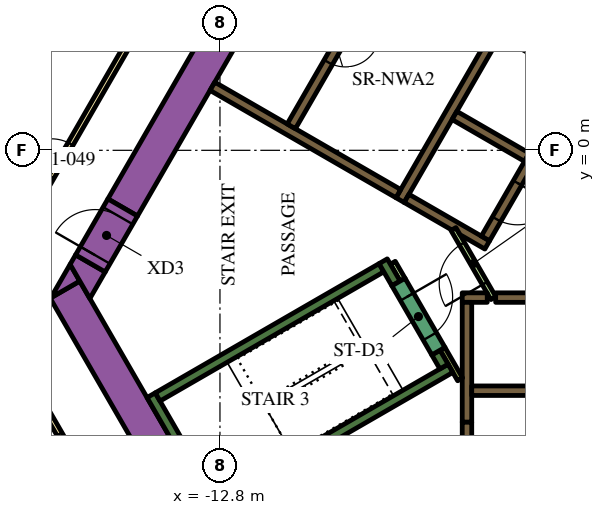
"""IFC4 building model, lengths in metres.
Left out: names, types, materials, properties, quantities, classifications, styles, units other than length and angle.
Written with IfcOpenShell. Run it as: python <this file> out.ifc"""

import sys

from ifc_helpers import new_model, si_unit, direction, frame, frame_2d, origin, place, context, subcontext, project, spatial, polyline, rectangle, outline, extrude, element, fill, save


model = new_model("IFC4")
c1 = context("Model", 3, precision=1e-05, world=origin(), true_north=direction((0.0, 1.0)))
c2 = subcontext(c1, "Body", "Model", "MODEL_VIEW")
j1 = project(units=[si_unit("LENGTHUNIT", "METRE"), si_unit("PLANEANGLEUNIT", "RADIAN")], contexts=[c1])
p1 = place(None, origin())
s1 = spatial("IfcSite", under=j1, at=p1, CompositionType="ELEMENT")
p2 = place(p1, origin())
s2 = spatial("IfcBuilding", under=s1, at=p2, CompositionType="ELEMENT")
p3 = place(p2, frame((0.0, 0.0, 31.5)))
s3 = spatial("IfcBuildingStorey", under=s2, at=p3, CompositionType="ELEMENT", Elevation=31.5)
p4 = place(p3, frame((-15.36, -1.503, 0.0), z_axis=(0.0, 0.0, 1.0), x_axis=(0.50000389221, 0.866023156604, 0.0)))
e1 = element("IfcWall", 1, at=p4, inside=s3, PredefinedType="SOLIDWALL", context=c2, shape_type="SweptSolid", body=[
    extrude(rectangle(XDim=21.0, YDim=0.9, at=frame_2d((10.5, 0.0))), origin(), (0.0, 0.0, 1.0), 3.9),
])
p5 = place(p3, frame((-12.134, -11.883, 0.0), z_axis=(0.0, 0.0, 1.0), x_axis=(-0.500005339912, 0.866022320763, 0.0)))
e2 = element("IfcWall", 2, at=p5, inside=s3, PredefinedType="SOLIDWALL", context=c2, shape_type="SweptSolid", body=[
    extrude(rectangle(XDim=9.488, YDim=0.9, at=frame_2d((4.744, 0.0))), origin(), (0.0, 0.0, 1.0), 3.9),
])
p6 = place(p3, origin())
e3 = element("IfcWall", 3, at=p6, inside=s3, PredefinedType="SOLIDWALL", context=c2, shape_type="SweptSolid", body=[
    extrude(outline(polyline([(-16.489, -3.44), (-17.251, -3.88), (-16.743, -3.0), (-16.489, -3.44)])), origin(), (0.0, 0.0, 1.0), 3.9),
])
e4 = element("IfcWall", 4, at=p6, inside=s3, PredefinedType="SOLIDWALL", context=c2, shape_type="SweptSolid", body=[
    extrude(outline(polyline([(-15.82, -3.201), (-16.223, -3.9), (-16.743, -3.0), (-16.599, -2.751), (-15.82, -3.201)])), origin(), (0.0, 0.0, 1.0), 3.9),
])
p7 = place(p3, frame((-12.885, -9.431, 0.0), z_axis=(0.0, 0.0, 1.0), x_axis=(-0.500020560727, 0.866013532718, 0.0)))
e5 = element("IfcWall", 5, at=p7, inside=s3, PredefinedType="SOLIDWALL", context=c2, shape_type="SweptSolid", body=[
    extrude(rectangle(XDim=3.45, YDim=0.25, at=frame_2d((1.725, 0.0))), origin(), (0.0, 0.0, 1.0), 3.9),
])
p8 = place(p3, frame((-14.44, -6.49, 0.0), z_axis=(0.0, 0.0, 1.0), x_axis=(0.866022966069, 0.500004222222, 0.0)))
e6 = element("IfcWall", 6, at=p8, inside=s3, PredefinedType="SOLIDWALL", context=c2, shape_type="SweptSolid", body=[
    extrude(rectangle(XDim=6.8, YDim=0.25, at=frame_2d((3.4, 0.0))), origin(), (0.0, 0.0, 1.0), 3.9),
])
p9 = place(p3, frame((-8.168, -3.503, 0.0), z_axis=(0.0, 0.0, 1.0), x_axis=(-0.499952099219, 0.866053057547, 0.0)))
e7 = element("IfcWall", 7, at=p9, inside=s3, PredefinedType="SOLIDWALL", context=c2, shape_type="SweptSolid", body=[
    extrude(rectangle(XDim=0.675, YDim=0.25, at=frame_2d((0.337, 0.0))), origin(), (0.0, 0.0, 1.0), 3.9),
])
p10 = place(p3, frame((-12.84, -9.261, 0.0), z_axis=(0.0, 0.0, 1.0), x_axis=(0.866016039709, 0.500016218704, 0.0)))
e8 = element("IfcWall", 8, at=p10, inside=s3, PredefinedType="SOLIDWALL", context=c2, shape_type="SweptSolid", body=[
    extrude(rectangle(XDim=7.05, YDim=0.25, at=frame_2d((3.525, 0.0))), origin(), (0.0, 0.0, 1.0), 3.9),
])
p11 = place(p3, frame((-6.905, -5.69, 0.0), z_axis=(0.0, 0.0, 1.0), x_axis=(-0.500402024738, 0.865793170242, 0.0)))
e9 = element("IfcWall", 9, at=p11, inside=s3, PredefinedType="SOLIDWALL", context=c2, shape_type="SweptSolid", body=[
    extrude(rectangle(XDim=0.425, YDim=0.25, at=frame_2d((0.212, 0.0))), origin(), (0.0, 0.0, 1.0), 3.9),
])
p12 = place(p3, frame((-5.545, -3.875, 0.0), z_axis=(0.0, 0.0, 1.0), x_axis=(1.0, 0.0, 0.0)))
e10 = element("IfcWall", 10, at=p12, inside=s3, PredefinedType="SOLIDWALL", context=c2, shape_type="SweptSolid", body=[
    extrude(rectangle(XDim=11.97, YDim=0.25, at=frame_2d((5.985, 0.0))), origin(), (0.0, 0.0, 1.0), 3.9),
])
p13 = place(p3, frame((-6.425, -3.875, 0.0), z_axis=(0.0, 0.0, 1.0), x_axis=(1.0, 0.0, 0.0)))
e11 = element("IfcWall", 11, at=p13, inside=s3, PredefinedType="SOLIDWALL", context=c2, shape_type="SweptSolid", body=[
    extrude(rectangle(XDim=0.658, YDim=0.25, at=frame_2d((0.329, 0.0))), origin(), (0.0, 0.0, 1.0), 3.9),
])
p14 = place(p3, frame((-6.3, -4.0, 0.0), z_axis=(0.0, 0.0, 1.0), x_axis=(0.0, -1.0, 0.0)))
e12 = element("IfcWall", 12, at=p14, inside=s3, PredefinedType="SOLIDWALL", context=c2, shape_type="SweptSolid", body=[
    extrude(rectangle(XDim=3.154, YDim=0.25, at=frame_2d((1.577, 0.0))), origin(), (0.0, 0.0, 1.0), 3.9),
])
p15 = place(p3, frame((-8.06, -1.311, 0.0), z_axis=(0.0, 0.0, 1.0), x_axis=(0.50000273126, 0.866023826885, 0.0)))
e13 = element("IfcWall", 13, at=p15, inside=s3, PredefinedType="SOLIDWALL", context=c2, shape_type="SweptSolid", body=[
    extrude(rectangle(XDim=10.33, YDim=0.25, at=frame_2d((5.165, 0.0))), origin(), (0.0, 0.0, 1.0), 3.9),
])
for number, where, z_axis, x_axis in (
    (14, (-5.369, 3.1, 0.0), (0.0, 0.0, 1.0), (0.866, -0.5, 0.0)),
    (15, (-4.724, -0.182, 0.0), (0.0, 0.0, 1.0), (-0.866, 0.5, 0.0)),
):
    element("IfcWall", number, at=place(p3, frame(where, z_axis=z_axis, x_axis=x_axis)), inside=s3, PredefinedType="SOLIDWALL", context=c2, shape_type="SweptSolid", body=[
        extrude(rectangle(XDim=2.2, YDim=0.25, at=frame_2d((1.1, 0.0))), origin(), (0.0, 0.0, 1.0), 3.9),
    ])
e16 = element("IfcWall", 16, at=p6, inside=s3, PredefinedType="SOLIDWALL", context=c2, shape_type="SweptSolid", body=[
    extrude(outline(polyline([(-5.922, -2.257), (-5.922, -2.257), (-5.705, -2.382), (-5.83, -2.598), (-6.483, -2.221), (-6.591, -2.033), (-6.591, -2.033), (-6.7, -2.096), (-7.952, -1.373), (-7.827, -1.156), (-5.922, -2.257)])), origin(), (0.0, 0.0, 1.0), 3.9),
])
p16 = place(p3, frame((-8.106, -1.14, 0.0), z_axis=(0.0, 0.0, 1.0), x_axis=(-0.866000643155, 0.500042884217, 0.0)))
e17 = element("IfcWall", 17, at=p16, inside=s3, PredefinedType="SOLIDWALL", context=c2, shape_type="SweptSolid", body=[
    extrude(rectangle(XDim=5.65, YDim=0.25, at=frame_2d((2.825, 0.0))), origin(), (0.0, 0.0, 1.0), 3.9),
])
p17 = place(p3, frame((-6.48, -6.027, 0.0), z_axis=(0.0, 0.0, 1.0), x_axis=(-0.499927229454, 0.866067413802, 0.0)))
e18 = element("IfcWall", 18, at=p17, inside=s3, PredefinedType="PARTITIONING", context=c2, shape_type="SweptSolid", body=[
    extrude(rectangle(XDim=0.929, YDim=0.15, at=frame_2d((0.464, 0.0))), origin(), (0.0, 0.0, 1.0), 3.9),
])
p18 = place(p3, frame((-8.252, -2.958, 0.0), z_axis=(0.0, 0.0, 1.0), x_axis=(0.500174715838, -0.865924508047, 0.0)))
e19 = element("IfcWall", 19, at=p18, inside=s3, PredefinedType="PARTITIONING", context=c2, shape_type="SweptSolid", body=[
    extrude(rectangle(XDim=0.514, YDim=0.15, at=frame_2d((0.257, 0.0))), origin(), (0.0, 0.0, 1.0), 2.75),
])
p19 = place(p3, frame((-6.175, -6.325, 0.0), z_axis=(0.0, 0.0, 1.0), x_axis=(1.0, 0.0, 0.0)))
e20 = element("IfcWall", 20, at=p19, inside=s3, PredefinedType="SOLIDWALL", context=c2, shape_type="SweptSolid", body=[
    extrude(rectangle(XDim=12.35, YDim=0.25, at=frame_2d((6.175, 0.0))), origin(), (0.0, 0.0, 1.0), 3.9),
])
p20 = place(p19, frame((3.205, 0.0, 0.0)))
e21 = element("IfcOpeningElement", 21, at=p20, cuts=e20, PredefinedType="OPENING", context=c2, shape_type="SweptSolid", body=[
    extrude(rectangle(XDim=0.9, YDim=2.1, at=frame_2d((0.45, 1.05))), frame((0.0, 0.135, 0.0), z_axis=(0.0, -1.0, 0.0), x_axis=(1.0, 0.0, 0.0)), (0.0, 0.0, 1.0), 0.27),
])
p21 = place(p19, frame((8.145, 0.0, 0.0)))
e22 = element("IfcOpeningElement", 22, at=p21, cuts=e20, PredefinedType="OPENING", context=c2, shape_type="SweptSolid", body=[
    extrude(rectangle(XDim=1.1, YDim=2.1, at=frame_2d((0.55, 1.05))), frame((0.0, 0.135, 0.0), z_axis=(0.0, -1.0, 0.0), x_axis=(1.0, 0.0, 0.0)), (0.0, 0.0, 1.0), 0.27),
])
p22 = place(p19, frame((10.665, 0.0, 0.0)))
e23 = element("IfcOpeningElement", 23, at=p22, cuts=e20, PredefinedType="OPENING", context=c2, shape_type="SweptSolid", body=[
    extrude(rectangle(XDim=1.1, YDim=2.1, at=frame_2d((0.55, 1.05))), frame((0.0, 0.135, 0.0), z_axis=(0.0, -1.0, 0.0), x_axis=(1.0, 0.0, 0.0)), (0.0, 0.0, 1.0), 0.27),
])
p23 = place(p3, frame((-6.008, 9.144, 0.0), z_axis=(0.0, 0.0, 1.0), x_axis=(-0.500006956611, -0.866021387346, 0.0)))
e24 = element("IfcWall", 24, at=p23, inside=s3, PredefinedType="SOLIDWALL", context=c2, shape_type="SweptSolid", body=[
    extrude(rectangle(XDim=9.83, YDim=0.25, at=frame_2d((4.915, 0.0))), origin(), (0.0, 0.0, 1.0), 3.9),
])
p24 = place(p23, frame((6.985, 0.0, 0.0)))
e25 = element("IfcOpeningElement", 25, at=p24, cuts=e24, PredefinedType="OPENING", context=c2, shape_type="SweptSolid", body=[
    extrude(rectangle(XDim=0.9, YDim=2.1, at=frame_2d((0.45, 1.05))), frame((0.0, 0.135, 0.0), z_axis=(0.0, -1.0, 0.0), x_axis=(1.0, 0.0, 0.0)), (0.0, 0.0, 1.0), 0.27),
])
p25 = place(p3, frame((-0.898, 6.194, 0.0), z_axis=(0.0, 0.0, 1.0), x_axis=(-0.499996202215, -0.866027596426, 0.0)))
e26 = element("IfcWall", 26, at=p25, inside=s3, PredefinedType="SOLIDWALL", context=c2, shape_type="SweptSolid", body=[
    extrude(rectangle(XDim=9.83, YDim=0.25, at=frame_2d((4.915, 0.0))), origin(), (0.0, 0.0, 1.0), 3.9),
])
p26 = place(p25, frame((0.585, 0.0, 0.0)))
e27 = element("IfcOpeningElement", 27, at=p26, cuts=e26, PredefinedType="OPENING", context=c2, shape_type="SweptSolid", body=[
    extrude(rectangle(XDim=1.1, YDim=2.1, at=frame_2d((0.55, 1.05))), frame((0.0, 0.135, 0.0), z_axis=(0.0, -1.0, 0.0), x_axis=(1.0, 0.0, 0.0)), (0.0, 0.0, 1.0), 0.27),
])
p27 = place(p25, frame((3.105, 0.0, 0.0)))
e28 = element("IfcOpeningElement", 28, at=p27, cuts=e26, PredefinedType="OPENING", context=c2, shape_type="SweptSolid", body=[
    extrude(rectangle(XDim=1.1, YDim=2.1, at=frame_2d((0.55, 1.05))), frame((0.0, 0.135, 0.0), z_axis=(0.0, -1.0, 0.0), x_axis=(1.0, 0.0, 0.0)), (0.0, 0.0, 1.0), 0.27),
])
p28 = place(p25, frame((5.625, 0.0, 0.0)))
e29 = element("IfcOpeningElement", 29, at=p28, cuts=e26, PredefinedType="OPENING", context=c2, shape_type="SweptSolid", body=[
    extrude(rectangle(XDim=1.1, YDim=2.1, at=frame_2d((0.55, 1.05))), frame((0.0, 0.135, 0.0), z_axis=(0.0, -1.0, 0.0), x_axis=(1.0, 0.0, 0.0)), (0.0, 0.0, 1.0), 0.27),
])
p29 = place(p25, frame((8.145, 0.0, 0.0)))
e30 = element("IfcOpeningElement", 30, at=p29, cuts=e26, PredefinedType="OPENING", context=c2, shape_type="SweptSolid", body=[
    extrude(rectangle(XDim=1.1, YDim=2.1, at=frame_2d((0.55, 1.05))), frame((0.0, 0.135, 0.0), z_axis=(0.0, -1.0, 0.0), x_axis=(1.0, 0.0, 0.0)), (0.0, 0.0, 1.0), 0.27),
])
p30 = place(p3, frame((-8.103, -3.466, 0.0), z_axis=(0.0, 0.0, 1.0), x_axis=(0.500078061341, -0.865980330357, 0.0)))
e31 = element("IfcWall", 31, at=p30, inside=s3, PredefinedType="SOLIDWALL", context=c2, shape_type="SweptSolid", body=[
    extrude(rectangle(XDim=2.1, YDim=0.4, at=frame_2d((1.05, 0.0))), origin(), (0.0, 0.0, 1.0), 3.9),
])
p31 = place(p30, frame((0.45, 0.0, 0.0)))
e32 = element("IfcOpeningElement", 32, at=p31, cuts=e31, PredefinedType="OPENING", context=c2, shape_type="SweptSolid", body=[
    extrude(rectangle(XDim=1.2, YDim=2.1, at=frame_2d((0.6, 1.05))), frame((0.0, 0.21, 0.0), z_axis=(0.0, -1.0, 0.0), x_axis=(1.0, 0.0, 0.0)), (0.0, 0.0, 1.0), 0.42),
])
p32 = place(p3, frame((-6.3, -7.154, 0.0), z_axis=(0.0, 0.0, 1.0), x_axis=(0.0, -1.0, 0.0)))
e33 = element("IfcWall", 33, at=p32, inside=s3, PredefinedType="SOLIDWALL", context=c2, shape_type="SweptSolid", body=[
    extrude(rectangle(XDim=1.8, YDim=0.25, at=frame_2d((0.9, 0.0))), origin(), (0.0, 0.0, 1.0), 3.9),
])
p33 = place(p32, frame((0.45, 0.0, 0.0)))
e34 = element("IfcOpeningElement", 34, at=p33, cuts=e33, PredefinedType="OPENING", context=c2, shape_type="SweptSolid", body=[
    extrude(rectangle(XDim=0.9, YDim=2.1, at=frame_2d((0.45, 1.05))), frame((0.0, 0.135, 0.0), z_axis=(0.0, -1.0, 0.0), x_axis=(1.0, 0.0, 0.0)), (0.0, 0.0, 1.0), 0.27),
])
p34 = place(p3, frame((-5.606, -3.89, 0.0), z_axis=(0.0, 0.0, 1.0), x_axis=(-0.500027713859, 0.866009402589, 0.0)))
e35 = element("IfcWall", 35, at=p34, inside=s3, PredefinedType="PARTITIONING", context=c2, shape_type="SweptSolid", body=[
    extrude(rectangle(XDim=2.1, YDim=0.15, at=frame_2d((1.05, 0.0))), origin(), (0.0, 0.0, 1.0), 2.75),
])
p35 = place(p34, frame((0.45, 0.0, 0.0)))
e36 = element("IfcOpeningElement", 36, at=p35, cuts=e35, PredefinedType="OPENING", context=c2, shape_type="SweptSolid", body=[
    extrude(rectangle(XDim=1.2, YDim=2.1, at=frame_2d((0.6, 1.05))), frame((0.0, 0.085, 0.0), z_axis=(0.0, -1.0, 0.0), x_axis=(1.0, 0.0, 0.0)), (0.0, 0.0, 1.0), 0.17),
])
p36 = place(p3, frame((-16.209, -2.976, 0.0), z_axis=(0.0, 0.0, 1.0), x_axis=(0.499954529098, 0.86605165483, 0.0)))
e37 = element("IfcWall", 37, at=p36, inside=s3, PredefinedType="SOLIDWALL", context=c2, shape_type="SweptSolid", body=[
    extrude(rectangle(XDim=1.7, YDim=0.9, at=frame_2d((0.85, 0.0))), origin(), (0.0, 0.0, 1.0), 3.9),
])
p37 = place(p36, frame((0.25, 0.0, 0.0)))
e38 = element("IfcOpeningElement", 38, at=p37, cuts=e37, PredefinedType="OPENING", context=c2, shape_type="SweptSolid", body=[
    extrude(rectangle(XDim=1.2, YDim=2.1, at=frame_2d((0.6, 1.05))), frame((0.0, 0.46, 0.0), z_axis=(0.0, -1.0, 0.0), x_axis=(1.0, 0.0, 0.0)), (0.0, 0.0, 1.0), 0.92),
])
p38 = place(p3, frame((-19.081, -3.9, 0.0), z_axis=(0.0, 0.0, 1.0), x_axis=(0.499998313975, 0.866026377209, 0.0)))
e39 = element("IfcWall", 39, at=p38, inside=s3, PredefinedType="PARTITIONING", context=c2, shape_type="SweptSolid", body=[
    extrude(rectangle(XDim=25.766, YDim=0.15, at=frame_2d((12.883, 0.0))), origin(), (0.0, 0.0, 1.0), 2.75),
])
p39 = place(p38, frame((24.586, 0.0, 0.0)))
e40 = element("IfcOpeningElement", 40, at=p39, cuts=e39, PredefinedType="OPENING", context=c2, shape_type="SweptSolid", body=[
    extrude(rectangle(XDim=1.0, YDim=2.1, at=frame_2d((0.5, 1.05))), frame((0.0, 0.085, 0.0), z_axis=(0.0, -1.0, 0.0), x_axis=(1.0, 0.0, 0.0)), (0.0, 0.0, 1.0), 0.17),
])
p40 = place(p38, frame((16.196, 0.0, 0.0)))
e41 = element("IfcOpeningElement", 41, at=p40, cuts=e39, PredefinedType="OPENING", context=c2, shape_type="SweptSolid", body=[
    extrude(rectangle(XDim=1.0, YDim=2.1, at=frame_2d((0.5, 1.05))), frame((0.0, 0.085, 0.0), z_axis=(0.0, -1.0, 0.0), x_axis=(1.0, 0.0, 0.0)), (0.0, 0.0, 1.0), 0.17),
])
p41 = place(p38, frame((14.789, 0.0, 0.0)))
e42 = element("IfcOpeningElement", 42, at=p41, cuts=e39, PredefinedType="OPENING", context=c2, shape_type="SweptSolid", body=[
    extrude(rectangle(XDim=1.1, YDim=2.1, at=frame_2d((0.55, 1.05))), frame((0.0, 0.085, 0.0), z_axis=(0.0, -1.0, 0.0), x_axis=(1.0, 0.0, 0.0)), (0.0, 0.0, 1.0), 0.17),
])
p42 = place(p38, frame((3.698, 0.0, 0.0)))
e43 = element("IfcOpeningElement", 43, at=p42, cuts=e39, PredefinedType="OPENING", context=c2, shape_type="SweptSolid", body=[
    extrude(rectangle(XDim=1.0, YDim=2.1, at=frame_2d((0.5, 1.05))), frame((0.0, 0.085, 0.0), z_axis=(0.0, -1.0, 0.0), x_axis=(1.0, 0.0, 0.0)), (0.0, 0.0, 1.0), 0.17),
])
p43 = place(p38, frame((1.531, 0.0, 0.0)))
e44 = element("IfcOpeningElement", 44, at=p43, cuts=e39, PredefinedType="OPENING", context=c2, shape_type="SweptSolid", body=[
    extrude(rectangle(XDim=0.9, YDim=2.1, at=frame_2d((0.45, 1.05))), frame((0.0, 0.085, 0.0), z_axis=(0.0, -1.0, 0.0), x_axis=(1.0, 0.0, 0.0)), (0.0, 0.0, 1.0), 0.17),
])
p44 = place(p3, frame((-16.412, -8.523, 0.0), z_axis=(0.0, 0.0, 1.0), x_axis=(-0.500001929737, 0.866024289647, 0.0)))
e45 = element("IfcWall", 45, at=p44, inside=s3, PredefinedType="PARTITIONING", context=c2, shape_type="SweptSolid", body=[
    extrude(rectangle(XDim=5.268, YDim=0.15, at=frame_2d((2.634, 0.0))), origin(), (0.0, 0.0, 1.0), 2.75),
])
p45 = place(p44, frame((0.226, 0.0, 0.0)))
e46 = element("IfcOpeningElement", 46, at=p45, cuts=e45, PredefinedType="OPENING", context=c2, shape_type="SweptSolid", body=[
    extrude(rectangle(XDim=1.0, YDim=2.1, at=frame_2d((0.5, 1.05))), frame((0.0, 0.085, 0.0), z_axis=(0.0, -1.0, 0.0), x_axis=(1.0, 0.0, 0.0)), (0.0, 0.0, 1.0), 0.17),
])
p46 = place(p24, origin())
e47 = element("IfcDoor", 47, at=p46, inside=s3, OperationType="SINGLE_SWING_LEFT", PredefinedType="DOOR", context=c2, shape_type="SweptSolid", body=[
    extrude(rectangle(XDim=0.9, YDim=2.1, at=frame_2d((0.45, 1.05))), frame((0.0, 0.025, 0.0), z_axis=(0.0, -1.0, 0.0), x_axis=(1.0, 0.0, 0.0)), (0.0, 0.0, 1.0), 0.05),
])
fill(e25, e47)
p47 = place(p29, origin())
e48 = element("IfcDoor", 48, at=p47, inside=s3, OperationType="DOUBLE_DOOR_SLIDING", PredefinedType="DOOR", context=c2, shape_type="SweptSolid", body=[
    extrude(rectangle(XDim=1.1, YDim=2.1, at=frame_2d((0.55, 1.05))), frame((0.0, 0.025, 0.0), z_axis=(0.0, -1.0, 0.0), x_axis=(1.0, 0.0, 0.0)), (0.0, 0.0, 1.0), 0.05),
])
fill(e30, e48)
p48 = place(p31, origin())
e49 = element("IfcDoor", 49, at=p48, inside=s3, OperationType="SINGLE_SWING_LEFT", PredefinedType="DOOR", context=c2, shape_type="SweptSolid", body=[
    extrude(rectangle(XDim=1.2, YDim=2.1, at=frame_2d((0.6, 1.05))), frame((0.0, 0.025, 0.0), z_axis=(0.0, -1.0, 0.0), x_axis=(1.0, 0.0, 0.0)), (0.0, 0.0, 1.0), 0.05),
])
fill(e32, e49)
p49 = place(p35, origin())
e50 = element("IfcDoor", 50, at=p49, inside=s3, OperationType="SINGLE_SWING_LEFT", PredefinedType="DOOR", context=c2, shape_type="SweptSolid", body=[
    extrude(rectangle(XDim=1.2, YDim=2.1, at=frame_2d((0.6, 1.05))), frame((0.0, 0.025, 0.0), z_axis=(0.0, -1.0, 0.0), x_axis=(1.0, 0.0, 0.0)), (0.0, 0.0, 1.0), 0.05),
])
fill(e36, e50)
p50 = place(p37, origin())
e51 = element("IfcDoor", 51, at=p50, inside=s3, OperationType="SINGLE_SWING_LEFT", PredefinedType="DOOR", context=c2, shape_type="SweptSolid", body=[
    extrude(rectangle(XDim=1.2, YDim=2.1, at=frame_2d((0.6, 1.05))), frame((0.0, 0.025, 0.0), z_axis=(0.0, -1.0, 0.0), x_axis=(1.0, 0.0, 0.0)), (0.0, 0.0, 1.0), 0.05),
])
fill(e38, e51)
p51 = place(p42, origin())
e52 = element("IfcDoor", 52, at=p51, inside=s3, OperationType="SINGLE_SWING_LEFT", PredefinedType="DOOR", context=c2, shape_type="SweptSolid", body=[
    extrude(rectangle(XDim=1.0, YDim=2.1, at=frame_2d((0.5, 1.05))), frame((0.0, 0.025, 0.0), z_axis=(0.0, -1.0, 0.0), x_axis=(1.0, 0.0, 0.0)), (0.0, 0.0, 1.0), 0.05),
])
fill(e43, e52)
p52 = place(p45, origin())
e53 = element("IfcDoor", 53, at=p52, inside=s3, OperationType="SINGLE_SWING_LEFT", PredefinedType="DOOR", context=c2, shape_type="SweptSolid", body=[
    extrude(rectangle(XDim=1.0, YDim=2.1, at=frame_2d((0.5, 1.05))), frame((0.0, 0.025, 0.0), z_axis=(0.0, -1.0, 0.0), x_axis=(1.0, 0.0, 0.0)), (0.0, 0.0, 1.0), 0.05),
])
fill(e46, e53)
save(model, sys.argv[1])
